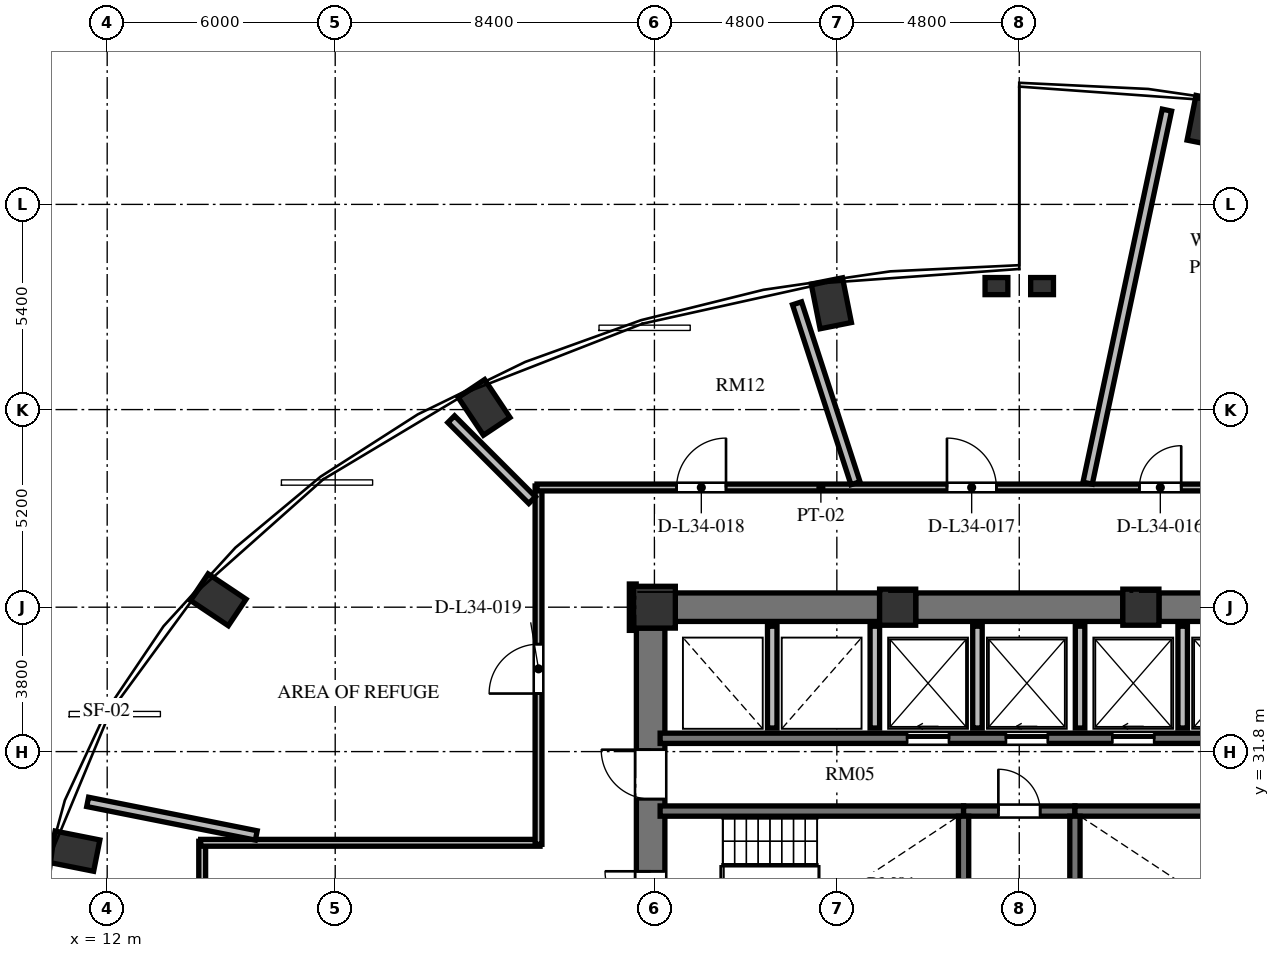
"""IFC4 building model, lengths in metres.
Left out: names, types, materials, properties, quantities, classifications, styles, units other than length and angle.
Written with IfcOpenShell. Run it as: python <this file> out.ifc"""

import sys

from ifc_helpers import new_model, si_unit, direction, frame, frame_2d, origin, origin_2d, place, context, subcontext, project, spatial, rectangle, extrude, element, fill, save


model = new_model("IFC4")
c1 = context("Model", 3, precision=1e-05, world=origin(), true_north=direction((0.0, 1.0)))
c2 = subcontext(c1, "Body", "Model", "MODEL_VIEW")
j1 = project(units=[si_unit("LENGTHUNIT", "METRE"), si_unit("PLANEANGLEUNIT", "RADIAN")], contexts=[c1])
p1 = place(None, origin())
s1 = spatial("IfcSite", under=j1, at=p1, CompositionType="ELEMENT")
p2 = place(p1, origin())
s2 = spatial("IfcBuilding", under=s1, at=p2, CompositionType="ELEMENT")
p3 = place(p2, frame((0.0, 0.0, 132.816)))
s3 = spatial("IfcBuildingStorey", under=s2, at=p3, CompositionType="ELEMENT", Elevation=132.816)
for number, where, z_axis, x_axis in (
    (1, (40.946, 48.397, 0.0), (0.0, 0.0, 1.0), (0.195, 0.981, 0.0)),
    (2, (31.054, 43.597, 0.0), (0.0, 0.0, 1.0), (-0.195, 0.981, 0.0)),
    (3, (21.916, 40.857, 0.0), (0.0, 0.0, 1.0), (-0.556, 0.831, 0.0)),
    (4, (14.922, 35.795, 0.0), (0.0, 0.0, 1.0), (-0.831, 0.556, 0.0)),
    (5, (11.137, 29.18, 0.0), (0.0, 0.0, 1.0), (-0.981, 0.195, 0.0)),
):
    element("IfcColumn", number, at=place(p3, frame(where, z_axis=z_axis, x_axis=x_axis)), inside=s3, PredefinedType="COLUMN", context=c2, shape_type="SweptSolid", body=[
        extrude(rectangle(XDim=1.2, YDim=0.84, at=origin_2d()), origin(), (0.0, 0.0, 1.0), 5.472),
    ])
for number, where, z_axis, x_axis in (
    (6, (39.2, 35.6, 0.0), (0.0, 0.0, 1.0), (1.0, 0.0, 0.0)),
    (7, (32.8, 35.6, 0.0), (0.0, 0.0, 1.0), (1.0, 0.0, 0.0)),
):
    element("IfcColumn", number, at=place(p3, frame(where, z_axis=z_axis, x_axis=x_axis)), inside=s3, PredefinedType="COLUMN", context=c2, shape_type="SweptSolid", body=[
        extrude(rectangle(XDim=0.95, YDim=0.95, at=origin_2d()), origin(), (0.0, 0.0, 1.0), 5.472),
    ])
p4 = place(p3, frame((26.4, 35.6, 0.0), z_axis=(0.0, 0.0, 1.0), x_axis=(1.0, 0.0, 0.0)))
e8 = element("IfcColumn", 8, at=p4, inside=s3, PredefinedType="COLUMN", context=c2, shape_type="SweptSolid", body=[
    extrude(rectangle(XDim=1.1, YDim=1.1, at=origin_2d()), origin(), (0.0, 0.0, 1.0), 5.472),
])
for number, where, z_axis, x_axis in (
    (9, (35.4, 44.05, 0.0), (0.0, 0.0, 1.0), (1.0, 0.0, 0.0)),
    (10, (36.6, 44.05, 0.0), (0.0, 0.0, 1.0), (1.0, 0.0, 0.0)),
):
    element("IfcColumn", number, at=place(p3, frame(where, z_axis=z_axis, x_axis=x_axis)), inside=s3, PredefinedType="PILASTER", context=c2, shape_type="SweptSolid", body=[
        extrude(rectangle(XDim=0.6, YDim=0.45, at=origin_2d()), origin(), (0.0, 0.0, 1.0), 5.472),
    ])
p5 = place(p3, frame((26.3, 20.95, 0.0), z_axis=(0.0, 0.0, 1.0), x_axis=(0.0, 1.0, 0.0)))
e11 = element("IfcWall", 11, at=p5, inside=s3, PredefinedType="SHEAR", context=c2, shape_type="SweptSolid", body=[
    extrude(rectangle(XDim=14.1, YDim=0.75, at=frame_2d((7.05, 0.0))), origin(), (0.0, 0.0, 1.0), 5.472),
])
p6 = place(p5, frame((6.5, 0.0, 0.0)))
e12 = element("IfcOpeningElement", 12, at=p6, cuts=e11, PredefinedType="OPENING", context=c2, shape_type="SweptSolid", body=[
    extrude(rectangle(XDim=1.2, YDim=2.15, at=frame_2d((0.6, 1.075))), frame((0.0, 0.385, 0.0), z_axis=(0.0, -1.0, 0.0), x_axis=(1.0, 0.0, 0.0)), (0.0, 0.0, 1.0), 0.77),
])
p7 = place(p5, frame((9.6, 0.0, 0.0)))
e13 = element("IfcOpeningElement", 13, at=p7, cuts=e11, PredefinedType="OPENING", context=c2, shape_type="SweptSolid", body=[
    extrude(rectangle(XDim=1.3, YDim=2.2, at=frame_2d((0.65, 1.1))), frame((0.0, 0.385, 0.0), z_axis=(0.0, -1.0, 0.0), x_axis=(1.0, 0.0, 0.0)), (0.0, 0.0, 1.0), 0.77),
])
p8 = place(p5, frame((3.26, 0.0, 0.0)))
e14 = element("IfcOpeningElement", 14, at=p8, cuts=e11, PredefinedType="OPENING", context=c2, shape_type="SweptSolid", body=[
    extrude(rectangle(XDim=1.3, YDim=2.2, at=frame_2d((0.65, 1.1))), frame((0.0, 0.385, 0.0), z_axis=(0.0, -1.0, 0.0), x_axis=(1.0, 0.0, 0.0)), (0.0, 0.0, 1.0), 0.77),
])
p9 = place(p3, frame((26.95, 35.6, 0.0), z_axis=(0.0, 0.0, 1.0), x_axis=(1.0, 0.0, 0.0)))
e15 = element("IfcWall", 15, at=p9, inside=s3, PredefinedType="SHEAR", context=c2, shape_type="SweptSolid", body=[
    extrude(rectangle(XDim=5.375, YDim=0.75, at=frame_2d((2.688, 0.0))), origin(), (0.0, 0.0, 1.0), 5.472),
])
p10 = place(p3, frame((33.275, 35.6, 0.0), z_axis=(0.0, 0.0, 1.0), x_axis=(1.0, 0.0, 0.0)))
e16 = element("IfcWall", 16, at=p10, inside=s3, PredefinedType="SHEAR", context=c2, shape_type="SweptSolid", body=[
    extrude(rectangle(XDim=5.45, YDim=0.75, at=frame_2d((2.725, 0.0))), origin(), (0.0, 0.0, 1.0), 5.472),
])
p11 = place(p3, frame((39.675, 35.6, 0.0), z_axis=(0.0, 0.0, 1.0), x_axis=(1.0, 0.0, 0.0)))
e17 = element("IfcWall", 17, at=p11, inside=s3, PredefinedType="SHEAR", context=c2, shape_type="SweptSolid", body=[
    extrude(rectangle(XDim=5.375, YDim=0.75, at=frame_2d((2.688, 0.0))), origin(), (0.0, 0.0, 1.0), 5.472),
])
p12 = place(p3, frame((26.55, 30.235, 0.0), z_axis=(0.0, 0.0, 1.0), x_axis=(1.0, 0.0, 0.0)))
e18 = element("IfcWall", 18, at=p12, inside=s3, PredefinedType="SHEAR", context=c2, shape_type="SweptSolid", body=[
    extrude(rectangle(XDim=7.985, YDim=0.27, at=frame_2d((3.992, 0.0))), origin(), (0.0, 0.0, 1.0), 5.472),
])
p13 = place(p3, frame((34.535, 30.235, 0.0), z_axis=(0.0, 0.0, 1.0), x_axis=(1.0, 0.0, 0.0)))
e19 = element("IfcWall", 19, at=p13, inside=s3, PredefinedType="SHEAR", context=c2, shape_type="SweptSolid", body=[
    extrude(rectangle(XDim=2.93, YDim=0.27, at=frame_2d((1.465, 0.0))), origin(), (0.0, 0.0, 1.0), 5.472),
])
p14 = place(p13, frame((0.915, 0.0, 0.0)))
e20 = element("IfcOpeningElement", 20, at=p14, cuts=e19, PredefinedType="OPENING", context=c2, shape_type="SweptSolid", body=[
    extrude(rectangle(XDim=1.1, YDim=2.15, at=frame_2d((0.55, 1.075))), frame((0.0, 0.145, 0.0), z_axis=(0.0, -1.0, 0.0), x_axis=(1.0, 0.0, 0.0)), (0.0, 0.0, 1.0), 0.29),
])
p15 = place(p3, frame((37.465, 30.235, 0.0), z_axis=(0.0, 0.0, 1.0), x_axis=(1.0, 0.0, 0.0)))
e21 = element("IfcWall", 21, at=p15, inside=s3, PredefinedType="SHEAR", context=c2, shape_type="SweptSolid", body=[
    extrude(rectangle(XDim=7.985, YDim=0.27, at=frame_2d((3.992, 0.0))), origin(), (0.0, 0.0, 1.0), 5.472),
])
p16 = place(p15, frame((6.455, 0.0, 0.0)))
e22 = element("IfcOpeningElement", 22, at=p16, cuts=e21, PredefinedType="OPENING", context=c2, shape_type="SweptSolid", body=[
    extrude(rectangle(XDim=1.2, YDim=2.15, at=frame_2d((0.6, 1.075))), frame((0.0, 0.145, 0.0), z_axis=(0.0, -1.0, 0.0), x_axis=(1.0, 0.0, 0.0)), (0.0, 0.0, 1.0), 0.29),
])
for number, where, z_axis, x_axis in (
    (23, (34.535, 26.02, 0.0), (0.0, 0.0, 1.0), (0.0, 1.0, 0.0)),
    (24, (37.465, 26.02, 0.0), (0.0, 0.0, 1.0), (0.0, 1.0, 0.0)),
):
    element("IfcWall", number, at=place(p3, frame(where, z_axis=z_axis, x_axis=x_axis)), inside=s3, PredefinedType="SHEAR", context=c2, shape_type="SweptSolid", body=[
        extrude(rectangle(XDim=4.08, YDim=0.27, at=frame_2d((2.04, 0.0))), origin(), (0.0, 0.0, 1.0), 5.472),
    ])
p17 = place(p3, frame((26.55, 32.15, 0.0), z_axis=(0.0, 0.0, 1.0), x_axis=(1.0, 0.0, 0.0)))
e25 = element("IfcWall", 25, at=p17, inside=s3, PredefinedType="SHEAR", context=c2, shape_type="SweptSolid", body=[
    extrude(rectangle(XDim=16.4, YDim=0.27, at=frame_2d((8.2, 0.0))), origin(), (0.0, 0.0, 1.0), 5.472),
])
p18 = place(p17, frame((6.5, 0.0, 0.0)))
e26 = element("IfcOpeningElement", 26, at=p18, cuts=e25, PredefinedType="OPENING", context=c2, shape_type="SweptSolid", body=[
    extrude(rectangle(XDim=1.1, YDim=2.2, at=frame_2d((0.55, 1.1))), frame((0.0, 0.145, 0.0), z_axis=(0.0, -1.0, 0.0), x_axis=(1.0, 0.0, 0.0)), (0.0, 0.0, 1.0), 0.29),
])
p19 = place(p17, frame((9.1, 0.0, 0.0)))
e27 = element("IfcOpeningElement", 27, at=p19, cuts=e25, PredefinedType="OPENING", context=c2, shape_type="SweptSolid", body=[
    extrude(rectangle(XDim=1.1, YDim=2.2, at=frame_2d((0.55, 1.1))), frame((0.0, 0.145, 0.0), z_axis=(0.0, -1.0, 0.0), x_axis=(1.0, 0.0, 0.0)), (0.0, 0.0, 1.0), 0.29),
])
p20 = place(p17, frame((11.9, 0.0, 0.0)))
e28 = element("IfcOpeningElement", 28, at=p20, cuts=e25, PredefinedType="OPENING", context=c2, shape_type="SweptSolid", body=[
    extrude(rectangle(XDim=1.1, YDim=2.2, at=frame_2d((0.55, 1.1))), frame((0.0, 0.145, 0.0), z_axis=(0.0, -1.0, 0.0), x_axis=(1.0, 0.0, 0.0)), (0.0, 0.0, 1.0), 0.29),
])
p21 = place(p17, frame((14.5, 0.0, 0.0)))
e29 = element("IfcOpeningElement", 29, at=p21, cuts=e25, PredefinedType="OPENING", context=c2, shape_type="SweptSolid", body=[
    extrude(rectangle(XDim=1.1, YDim=2.2, at=frame_2d((0.55, 1.1))), frame((0.0, 0.145, 0.0), z_axis=(0.0, -1.0, 0.0), x_axis=(1.0, 0.0, 0.0)), (0.0, 0.0, 1.0), 0.29),
])
for number, where, z_axis, x_axis in (
    (30, (29.5, 32.42, 0.0), (0.0, 0.0, 1.0), (0.0, 1.0, 0.0)),
    (31, (32.2, 32.42, 0.0), (0.0, 0.0, 1.0), (0.0, 1.0, 0.0)),
    (32, (34.9, 32.42, 0.0), (0.0, 0.0, 1.0), (0.0, 1.0, 0.0)),
    (33, (37.6, 32.42, 0.0), (0.0, 0.0, 1.0), (0.0, 1.0, 0.0)),
    (34, (40.3, 32.42, 0.0), (0.0, 0.0, 1.0), (0.0, 1.0, 0.0)),
):
    element("IfcWall", number, at=place(p3, frame(where, z_axis=z_axis, x_axis=x_axis)), inside=s3, PredefinedType="SOLIDWALL", context=c2, shape_type="SweptSolid", body=[
        extrude(rectangle(XDim=2.68, YDim=0.25, at=frame_2d((1.34, 0.0))), origin(), (0.0, 0.0, 1.0), 5.022),
    ])
p22 = place(p3, frame((14.5, 26.56, 0.0), z_axis=(0.0, 0.0, 1.0), x_axis=(0.0, 1.0, 0.0)))
e35 = element("IfcWall", 35, at=p22, inside=s3, PredefinedType="PARTITIONING", context=c2, shape_type="SweptSolid", body=[
    extrude(rectangle(XDim=2.88, YDim=0.18, at=frame_2d((1.44, 0.0))), origin(), (0.0, 0.0, 1.0), 5.022),
])
p23 = place(p3, frame((14.46, 29.4, 0.0), z_axis=(0.0, 0.0, 1.0), x_axis=(1.0, 0.0, 0.0)))
e36 = element("IfcWall", 36, at=p23, inside=s3, PredefinedType="PARTITIONING", context=c2, shape_type="SweptSolid", body=[
    extrude(rectangle(XDim=8.93, YDim=0.18, at=frame_2d((4.465, 0.0))), origin(), (0.0, 0.0, 1.0), 5.022),
])
p24 = place(p3, frame((23.35, 29.36, 0.0), z_axis=(0.0, 0.0, 1.0), x_axis=(0.0, 1.0, 0.0)))
e37 = element("IfcWall", 37, at=p24, inside=s3, PredefinedType="PARTITIONING", context=c2, shape_type="SweptSolid", body=[
    extrude(rectangle(XDim=9.43, YDim=0.18, at=frame_2d((4.715, 0.0))), origin(), (0.0, 0.0, 1.0), 4.707),
])
p25 = place(p24, frame((3.968, 0.0, 0.0)))
e38 = element("IfcOpeningElement", 38, at=p25, cuts=e37, PredefinedType="OPENING", context=c2, shape_type="SweptSolid", body=[
    extrude(rectangle(XDim=1.3, YDim=2.2, at=frame_2d((0.65, 1.1))), frame((0.0, 0.1, 0.0), z_axis=(0.0, -1.0, 0.0), x_axis=(1.0, 0.0, 0.0)), (0.0, 0.0, 1.0), 0.2),
])
p26 = place(p3, frame((23.31, 38.75, 0.0), z_axis=(0.0, 0.0, 1.0), x_axis=(1.0, 0.0, 0.0)))
e39 = element("IfcWall", 39, at=p26, inside=s3, PredefinedType="PARTITIONING", context=c2, shape_type="SweptSolid", body=[
    extrude(rectangle(XDim=29.88, YDim=0.18, at=frame_2d((14.94, 0.0))), origin(), (0.0, 0.0, 1.0), 4.647),
])
p27 = place(p26, frame((21.29, 0.0, 0.0)))
e40 = element("IfcOpeningElement", 40, at=p27, cuts=e39, PredefinedType="OPENING", context=c2, shape_type="SweptSolid", body=[
    extrude(rectangle(XDim=1.1, YDim=2.15, at=frame_2d((0.55, 1.075))), frame((0.0, 0.1, 0.0), z_axis=(0.0, -1.0, 0.0), x_axis=(1.0, 0.0, 0.0)), (0.0, 0.0, 1.0), 0.2),
])
p28 = place(p26, frame((15.852, 0.0, 0.0)))
e41 = element("IfcOpeningElement", 41, at=p28, cuts=e39, PredefinedType="OPENING", context=c2, shape_type="SweptSolid", body=[
    extrude(rectangle(XDim=1.1, YDim=2.15, at=frame_2d((0.55, 1.075))), frame((0.0, 0.1, 0.0), z_axis=(0.0, -1.0, 0.0), x_axis=(1.0, 0.0, 0.0)), (0.0, 0.0, 1.0), 0.2),
])
p29 = place(p26, frame((10.788, 0.0, 0.0)))
e42 = element("IfcOpeningElement", 42, at=p29, cuts=e39, PredefinedType="OPENING", context=c2, shape_type="SweptSolid", body=[
    extrude(rectangle(XDim=1.3, YDim=2.2, at=frame_2d((0.65, 1.1))), frame((0.0, 0.1, 0.0), z_axis=(0.0, -1.0, 0.0), x_axis=(1.0, 0.0, 0.0)), (0.0, 0.0, 1.0), 0.2),
])
p30 = place(p26, frame((3.674, 0.0, 0.0)))
e43 = element("IfcOpeningElement", 43, at=p30, cuts=e39, PredefinedType="OPENING", context=c2, shape_type="SweptSolid", body=[
    extrude(rectangle(XDim=1.3, YDim=2.2, at=frame_2d((0.65, 1.1))), frame((0.0, 0.1, 0.0), z_axis=(0.0, -1.0, 0.0), x_axis=(1.0, 0.0, 0.0)), (0.0, 0.0, 1.0), 0.2),
])
p31 = place(p3, frame((25.83, 36.21, 0.0), z_axis=(0.0, 0.0, 1.0), x_axis=(0.0, -1.0, 0.0)))
e44 = element("IfcWall", 44, at=p31, inside=s3, PredefinedType="PARTITIONING", context=c2, shape_type="SweptSolid", body=[
    extrude(rectangle(XDim=1.22, YDim=0.18, at=frame_2d((0.61, 0.0))), origin(), (0.0, 0.0, 1.0), 5.022),
])
p32 = place(p3, frame((37.799, 38.864, 0.0), z_axis=(0.0, 0.0, 1.0), x_axis=(0.207909086441, 0.978148154308, 0.0)))
e45 = element("IfcWall", 45, at=p32, inside=s3, PredefinedType="SOLIDWALL", context=c2, shape_type="SweptSolid", body=[
    extrude(rectangle(XDim=10.036, YDim=0.25, at=frame_2d((5.018, 0.0))), origin(), (0.0, 0.0, 1.0), 5.022),
])
p33 = place(p3, frame((31.691, 38.862, 0.0), z_axis=(0.0, 0.0, 1.0), x_axis=(-0.309009556848, 0.951058932862, 0.0)))
e46 = element("IfcWall", 46, at=p33, inside=s3, PredefinedType="SOLIDWALL", context=c2, shape_type="SweptSolid", body=[
    extrude(rectangle(XDim=4.978, YDim=0.25, at=frame_2d((2.489, 0.0))), origin(), (0.0, 0.0, 1.0), 5.022),
])
p34 = place(p3, frame((23.182, 38.418, 0.0), z_axis=(0.0, 0.0, 1.0), x_axis=(-0.707106781187, 0.707106781187, 0.0)))
e47 = element("IfcWall", 47, at=p34, inside=s3, PredefinedType="SOLIDWALL", context=c2, shape_type="SweptSolid", body=[
    extrude(rectangle(XDim=3.011, YDim=0.25, at=frame_2d((1.506, 0.0))), origin(), (0.0, 0.0, 1.0), 5.022),
])
p35 = place(p3, frame((15.923, 29.594, 0.0), z_axis=(0.0, 0.0, 1.0), x_axis=(-0.98077940709, 0.195119846833, 0.0)))
e48 = element("IfcWall", 48, at=p35, inside=s3, PredefinedType="SOLIDWALL", context=c2, shape_type="SweptSolid", body=[
    extrude(rectangle(XDim=4.524, YDim=0.25, at=frame_2d((2.262, 0.0))), origin(), (0.0, 0.0, 1.0), 5.022),
])
p36 = place(p6, origin())
e49 = element("IfcDoor", 49, at=p36, inside=s3, OperationType="SINGLE_SWING_RIGHT", PredefinedType="DOOR", context=c2, shape_type="SweptSolid", body=[
    extrude(rectangle(XDim=1.2, YDim=2.15, at=frame_2d((0.6, 1.075))), frame((0.0, 0.025, 0.0), z_axis=(0.0, -1.0, 0.0), x_axis=(1.0, 0.0, 0.0)), (0.0, 0.0, 1.0), 0.05),
])
fill(e12, e49)
p37 = place(p14, origin())
e50 = element("IfcDoor", 50, at=p37, inside=s3, OperationType="SINGLE_SWING_LEFT", PredefinedType="DOOR", context=c2, shape_type="SweptSolid", body=[
    extrude(rectangle(XDim=1.1, YDim=2.15, at=frame_2d((0.55, 1.075))), frame((0.0, 0.025, 0.0), z_axis=(0.0, -1.0, 0.0), x_axis=(1.0, 0.0, 0.0)), (0.0, 0.0, 1.0), 0.05),
])
fill(e20, e50)
p38 = place(p7, origin())
e51 = element("IfcDoor", 51, at=p38, inside=s3, OperationType="SINGLE_SWING_RIGHT", PredefinedType="DOOR", context=c2, shape_type="SweptSolid", body=[
    extrude(rectangle(XDim=1.3, YDim=2.2, at=frame_2d((0.65, 1.1))), frame((0.0, 0.025, 0.0), z_axis=(0.0, -1.0, 0.0), x_axis=(1.0, 0.0, 0.0)), (0.0, 0.0, 1.0), 0.05),
])
fill(e13, e51)
p39 = place(p18, origin())
e52 = element("IfcDoor", 52, at=p39, inside=s3, OperationType="SLIDING_TO_LEFT", PredefinedType="DOOR", context=c2, shape_type="SweptSolid", body=[
    extrude(rectangle(XDim=1.1, YDim=2.2, at=frame_2d((0.55, 1.1))), frame((0.0, 0.025, 0.0), z_axis=(0.0, -1.0, 0.0), x_axis=(1.0, 0.0, 0.0)), (0.0, 0.0, 1.0), 0.05),
])
fill(e26, e52)
p40 = place(p19, origin())
e53 = element("IfcDoor", 53, at=p40, inside=s3, OperationType="SLIDING_TO_LEFT", PredefinedType="DOOR", context=c2, shape_type="SweptSolid", body=[
    extrude(rectangle(XDim=1.1, YDim=2.2, at=frame_2d((0.55, 1.1))), frame((0.0, 0.025, 0.0), z_axis=(0.0, -1.0, 0.0), x_axis=(1.0, 0.0, 0.0)), (0.0, 0.0, 1.0), 0.05),
])
fill(e27, e53)
p41 = place(p20, origin())
e54 = element("IfcDoor", 54, at=p41, inside=s3, OperationType="SLIDING_TO_LEFT", PredefinedType="DOOR", context=c2, shape_type="SweptSolid", body=[
    extrude(rectangle(XDim=1.1, YDim=2.2, at=frame_2d((0.55, 1.1))), frame((0.0, 0.025, 0.0), z_axis=(0.0, -1.0, 0.0), x_axis=(1.0, 0.0, 0.0)), (0.0, 0.0, 1.0), 0.05),
])
fill(e28, e54)
p42 = place(p28, origin())
e55 = element("IfcDoor", 55, at=p42, inside=s3, OperationType="SINGLE_SWING_RIGHT", PredefinedType="DOOR", context=c2, shape_type="SweptSolid", body=[
    extrude(rectangle(XDim=1.1, YDim=2.15, at=frame_2d((0.55, 1.075))), frame((0.0, 0.025, 0.0), z_axis=(0.0, -1.0, 0.0), x_axis=(1.0, 0.0, 0.0)), (0.0, 0.0, 1.0), 0.05),
])
fill(e41, e55)
p43 = place(p29, origin())
e56 = element("IfcDoor", 56, at=p43, inside=s3, OperationType="SINGLE_SWING_LEFT", PredefinedType="DOOR", context=c2, shape_type="SweptSolid", body=[
    extrude(rectangle(XDim=1.3, YDim=2.2, at=frame_2d((0.65, 1.1))), frame((0.0, 0.025, 0.0), z_axis=(0.0, -1.0, 0.0), x_axis=(1.0, 0.0, 0.0)), (0.0, 0.0, 1.0), 0.05),
])
fill(e42, e56)
p44 = place(p30, origin())
e57 = element("IfcDoor", 57, at=p44, inside=s3, OperationType="SINGLE_SWING_RIGHT", PredefinedType="DOOR", context=c2, shape_type="SweptSolid", body=[
    extrude(rectangle(XDim=1.3, YDim=2.2, at=frame_2d((0.65, 1.1))), frame((0.0, 0.025, 0.0), z_axis=(0.0, -1.0, 0.0), x_axis=(1.0, 0.0, 0.0)), (0.0, 0.0, 1.0), 0.05),
])
fill(e43, e57)
p45 = place(p25, origin())
e58 = element("IfcDoor", 58, at=p45, inside=s3, OperationType="SINGLE_SWING_LEFT", PredefinedType="DOOR", context=c2, shape_type="SweptSolid", body=[
    extrude(rectangle(XDim=1.3, YDim=2.2, at=frame_2d((0.65, 1.1))), frame((0.0, 0.025, 0.0), z_axis=(0.0, -1.0, 0.0), x_axis=(1.0, 0.0, 0.0)), (0.0, 0.0, 1.0), 0.05),
])
fill(e38, e58)
save(model, sys.argv[1])
